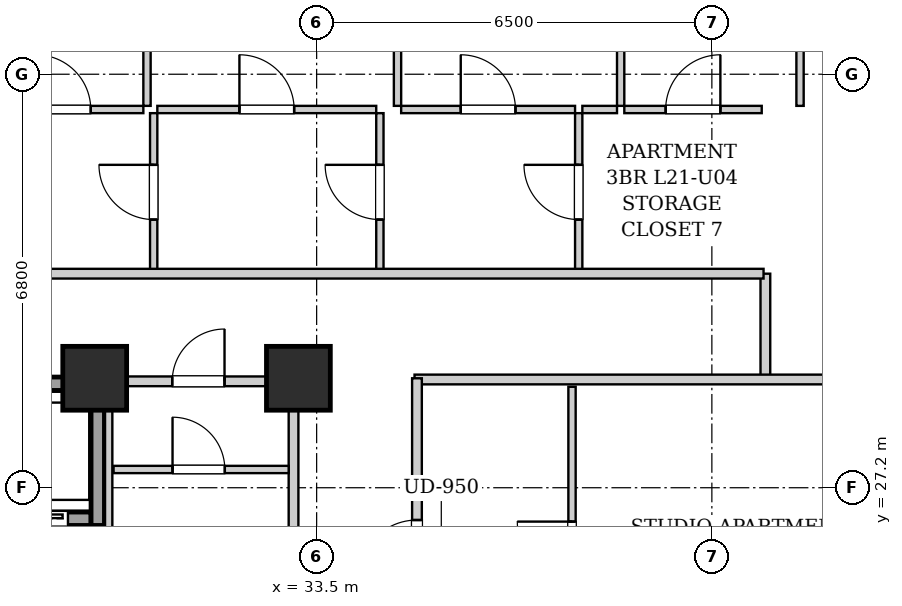
"""IFC4 building model, lengths in metres.
Left out: names, types, materials, properties, quantities, classifications, styles, units other than length and angle.
Written with IfcOpenShell. Run it as: python <this file> out.ifc"""

import sys

from ifc_helpers import new_model, si_unit, direction, frame, frame_2d, origin, origin_2d, place, context, subcontext, project, spatial, rectangle, extrude, element, fill, save


model = new_model("IFC4")
c1 = context("Model", 3, precision=1e-05, world=origin(), true_north=direction((0.0, 1.0)))
c2 = subcontext(c1, "Body", "Model", "MODEL_VIEW")
j1 = project(units=[si_unit("LENGTHUNIT", "METRE"), si_unit("PLANEANGLEUNIT", "RADIAN")], contexts=[c1])
p1 = place(None, origin())
s1 = spatial("IfcSite", under=j1, at=p1, CompositionType="ELEMENT")
p2 = place(p1, origin())
s2 = spatial("IfcBuilding", under=s1, at=p2, CompositionType="ELEMENT")
p3 = place(p2, frame((0.0, 0.0, 78.3)))
s3 = spatial("IfcBuildingStorey", under=s2, at=p3, CompositionType="ELEMENT", Elevation=78.3)
for number, where, z_axis, x_axis in (
    (1, (29.85, 29.0, 0.0), (0.0, 0.0, 1.0), (1.0, 0.0, 0.0)),
    (2, (33.2, 29.0, 0.0), (0.0, 0.0, 1.0), (1.0, 0.0, 0.0)),
):
    element("IfcColumn", number, at=place(p3, frame(where, z_axis=z_axis, x_axis=x_axis)), inside=s3, PredefinedType="COLUMN", context=c2, shape_type="SweptSolid", body=[
        extrude(rectangle(XDim=1.05, YDim=1.05, at=origin_2d()), origin(), (0.0, 0.0, 1.0), 3.2),
    ])
p4 = place(p3, frame((27.93, 26.69, 0.0), z_axis=(0.0, 0.0, 1.0), x_axis=(1.0, 0.0, 0.0)))
e3 = element("IfcWall", 3, at=p4, inside=s3, PredefinedType="SHEAR", context=c2, shape_type="SweptSolid", body=[
    extrude(rectangle(XDim=1.86, YDim=0.22, at=frame_2d((0.93, 0.0))), origin(), (0.0, 0.0, 1.0), 2.94),
])
p5 = place(p4, frame((0.38, 0.0, 0.0)))
e4 = element("IfcOpeningElement", 4, at=p5, cuts=e3, PredefinedType="OPENING", context=c2, shape_type="SweptSolid", body=[
    extrude(rectangle(XDim=1.1, YDim=2.15, at=frame_2d((0.55, 1.075))), frame((0.0, 0.12, 0.0), z_axis=(0.0, -1.0, 0.0), x_axis=(1.0, 0.0, 0.0)), (0.0, 0.0, 1.0), 0.24),
])
p6 = place(p3, frame((27.93, 28.91, 0.0), z_axis=(0.0, 0.0, 1.0), x_axis=(1.0, 0.0, 0.0)))
e5 = element("IfcWall", 5, at=p6, inside=s3, PredefinedType="SHEAR", context=c2, shape_type="SweptSolid", body=[
    extrude(rectangle(XDim=1.86, YDim=0.22, at=frame_2d((0.93, 0.0))), origin(), (0.0, 0.0, 1.0), 2.94),
])
p7 = place(p3, frame((29.9, 26.58, 0.0), z_axis=(0.0, 0.0, 1.0), x_axis=(0.0, 1.0, 0.0)))
e6 = element("IfcWall", 6, at=p7, inside=s3, PredefinedType="SHEAR", context=c2, shape_type="SweptSolid", body=[
    extrude(rectangle(XDim=2.44, YDim=0.22, at=frame_2d((1.22, 0.0))), origin(), (0.0, 0.0, 1.0), 2.94),
])
p8 = place(p3, frame((33.12, 24.12, 0.0), z_axis=(0.0, 0.0, 1.0), x_axis=(0.0, 1.0, 0.0)))
e7 = element("IfcWall", 7, at=p8, inside=s3, PredefinedType="PARTITIONING", context=c2, shape_type="SweptSolid", body=[
    extrude(rectangle(XDim=4.76, YDim=0.16, at=frame_2d((2.38, 0.0))), origin(), (0.0, 0.0, 1.0), 2.275),
])
p9 = place(p3, frame((30.08, 26.18, 0.0), z_axis=(0.0, 0.0, 1.0), x_axis=(0.0, 1.0, 0.0)))
e8 = element("IfcWall", 8, at=p9, inside=s3, PredefinedType="PARTITIONING", context=c2, shape_type="SweptSolid", body=[
    extrude(rectangle(XDim=2.68, YDim=0.12, at=frame_2d((1.34, 0.0))), origin(), (0.0, 0.0, 1.0), 2.94),
])
p10 = place(p3, frame((30.16, 27.5, 0.0), z_axis=(0.0, 0.0, 1.0), x_axis=(1.0, 0.0, 0.0)))
e9 = element("IfcWall", 9, at=p10, inside=s3, PredefinedType="PARTITIONING", context=c2, shape_type="SweptSolid", body=[
    extrude(rectangle(XDim=2.88, YDim=0.12, at=frame_2d((1.44, 0.0))), origin(), (0.0, 0.0, 1.0), 2.94),
])
p11 = place(p10, frame((0.97, 0.0, 0.0)))
e10 = element("IfcOpeningElement", 10, at=p11, cuts=e9, PredefinedType="OPENING", context=c2, shape_type="SweptSolid", body=[
    extrude(rectangle(XDim=0.86, YDim=2.05, at=frame_2d((0.43, 1.025))), frame((0.0, 0.07, 0.0), z_axis=(0.0, -1.0, 0.0), x_axis=(1.0, 0.0, 0.0)), (0.0, 0.0, 1.0), 0.14),
])
p12 = place(p3, frame((30.08, 28.95, 0.0), z_axis=(0.0, 0.0, 1.0), x_axis=(1.0, 0.0, 0.0)))
e11 = element("IfcWall", 11, at=p12, inside=s3, PredefinedType="PARTITIONING", context=c2, shape_type="SweptSolid", body=[
    extrude(rectangle(XDim=2.96, YDim=0.16, at=frame_2d((1.48, 0.0))), origin(), (0.0, 0.0, 1.0), 2.94),
])
p13 = place(p12, frame((1.045, 0.0, 0.0)))
e12 = element("IfcOpeningElement", 12, at=p13, cuts=e11, PredefinedType="OPENING", context=c2, shape_type="SweptSolid", body=[
    extrude(rectangle(XDim=0.86, YDim=2.05, at=frame_2d((0.43, 1.025))), frame((0.0, 0.09, 0.0), z_axis=(0.0, -1.0, 0.0), x_axis=(1.0, 0.0, 0.0)), (0.0, 0.0, 1.0), 0.18),
])
p14 = place(p3, frame((40.88, 28.98, 0.0), z_axis=(0.0, 0.0, 1.0), x_axis=(0.0, 1.0, 0.0)))
e13 = element("IfcWall", 13, at=p14, inside=s3, PredefinedType="PARTITIONING", context=c2, shape_type="SweptSolid", body=[
    extrude(rectangle(XDim=1.74, YDim=0.16, at=frame_2d((0.87, 0.0))), origin(), (0.0, 0.0, 1.0), 2.94),
])
p15 = place(p3, frame((35.11, 28.98, 0.0), z_axis=(0.0, 0.0, 1.0), x_axis=(1.0, 0.0, 0.0)))
e14 = element("IfcWall", 14, at=p15, inside=s3, PredefinedType="PARTITIONING", context=c2, shape_type="SweptSolid", body=[
    extrude(rectangle(XDim=8.01, YDim=0.16, at=frame_2d((4.005, 0.0))), origin(), (0.0, 0.0, 1.0), 2.309),
])
p16 = place(p3, frame((30.82, 30.76, 0.0), z_axis=(0.0, 0.0, 1.0), x_axis=(0.0, 1.0, 0.0)))
e15 = element("IfcWall", 15, at=p16, inside=s3, PredefinedType="PARTITIONING", context=c2, shape_type="SweptSolid", body=[
    extrude(rectangle(XDim=2.6, YDim=0.12, at=frame_2d((1.3, 0.0))), origin(), (0.0, 0.0, 1.0), 2.94),
])
p17 = place(p16, frame((0.85, 0.0, 0.0)))
e16 = element("IfcOpeningElement", 16, at=p17, cuts=e15, PredefinedType="OPENING", context=c2, shape_type="SweptSolid", body=[
    extrude(rectangle(XDim=0.9, YDim=2.05, at=frame_2d((0.45, 1.025))), frame((0.0, 0.07, 0.0), z_axis=(0.0, -1.0, 0.0), x_axis=(1.0, 0.0, 0.0)), (0.0, 0.0, 1.0), 0.14),
])
p18 = place(p3, frame((28.02, 33.42, 0.0), z_axis=(0.0, 0.0, 1.0), x_axis=(1.0, 0.0, 0.0)))
e17 = element("IfcWall", 17, at=p18, inside=s3, PredefinedType="PARTITIONING", context=c2, shape_type="SweptSolid", body=[
    extrude(rectangle(XDim=2.63, YDim=0.12, at=frame_2d((1.315, 0.0))), origin(), (0.0, 0.0, 1.0), 2.94),
])
p19 = place(p18, frame((0.865, 0.0, 0.0)))
e18 = element("IfcOpeningElement", 18, at=p19, cuts=e17, PredefinedType="OPENING", context=c2, shape_type="SweptSolid", body=[
    extrude(rectangle(XDim=0.9, YDim=2.05, at=frame_2d((0.45, 1.025))), frame((0.0, 0.07, 0.0), z_axis=(0.0, -1.0, 0.0), x_axis=(1.0, 0.0, 0.0)), (0.0, 0.0, 1.0), 0.14),
])
p20 = place(p3, frame((34.54, 30.76, 0.0), z_axis=(0.0, 0.0, 1.0), x_axis=(0.0, 1.0, 0.0)))
e19 = element("IfcWall", 19, at=p20, inside=s3, PredefinedType="PARTITIONING", context=c2, shape_type="SweptSolid", body=[
    extrude(rectangle(XDim=2.6, YDim=0.12, at=frame_2d((1.3, 0.0))), origin(), (0.0, 0.0, 1.0), 2.94),
])
p21 = place(p20, frame((0.85, 0.0, 0.0)))
e20 = element("IfcOpeningElement", 20, at=p21, cuts=e19, PredefinedType="OPENING", context=c2, shape_type="SweptSolid", body=[
    extrude(rectangle(XDim=0.9, YDim=2.05, at=frame_2d((0.45, 1.025))), frame((0.0, 0.07, 0.0), z_axis=(0.0, -1.0, 0.0), x_axis=(1.0, 0.0, 0.0)), (0.0, 0.0, 1.0), 0.14),
])
p22 = place(p3, frame((30.88, 33.42, 0.0), z_axis=(0.0, 0.0, 1.0), x_axis=(1.0, 0.0, 0.0)))
e21 = element("IfcWall", 21, at=p22, inside=s3, PredefinedType="PARTITIONING", context=c2, shape_type="SweptSolid", body=[
    extrude(rectangle(XDim=3.6, YDim=0.12, at=frame_2d((1.8, 0.0))), origin(), (0.0, 0.0, 1.0), 2.94),
])
p23 = place(p22, frame((1.35, 0.0, 0.0)))
e22 = element("IfcOpeningElement", 22, at=p23, cuts=e21, PredefinedType="OPENING", context=c2, shape_type="SweptSolid", body=[
    extrude(rectangle(XDim=0.9, YDim=2.05, at=frame_2d((0.45, 1.025))), frame((0.0, 0.07, 0.0), z_axis=(0.0, -1.0, 0.0), x_axis=(1.0, 0.0, 0.0)), (0.0, 0.0, 1.0), 0.14),
])
p24 = place(p3, frame((37.81, 30.76, 0.0), z_axis=(0.0, 0.0, 1.0), x_axis=(0.0, 1.0, 0.0)))
e23 = element("IfcWall", 23, at=p24, inside=s3, PredefinedType="PARTITIONING", context=c2, shape_type="SweptSolid", body=[
    extrude(rectangle(XDim=2.6, YDim=0.12, at=frame_2d((1.3, 0.0))), origin(), (0.0, 0.0, 1.0), 2.94),
])
p25 = place(p24, frame((0.85, 0.0, 0.0)))
e24 = element("IfcOpeningElement", 24, at=p25, cuts=e23, PredefinedType="OPENING", context=c2, shape_type="SweptSolid", body=[
    extrude(rectangle(XDim=0.9, YDim=2.05, at=frame_2d((0.45, 1.025))), frame((0.0, 0.07, 0.0), z_axis=(0.0, -1.0, 0.0), x_axis=(1.0, 0.0, 0.0)), (0.0, 0.0, 1.0), 0.14),
])
p26 = place(p3, frame((34.89, 33.42, 0.0), z_axis=(0.0, 0.0, 1.0), x_axis=(1.0, 0.0, 0.0)))
e25 = element("IfcWall", 25, at=p26, inside=s3, PredefinedType="PARTITIONING", context=c2, shape_type="SweptSolid", body=[
    extrude(rectangle(XDim=2.86, YDim=0.12, at=frame_2d((1.43, 0.0))), origin(), (0.0, 0.0, 1.0), 2.94),
])
p27 = place(p26, frame((0.98, 0.0, 0.0)))
e26 = element("IfcOpeningElement", 26, at=p27, cuts=e25, PredefinedType="OPENING", context=c2, shape_type="SweptSolid", body=[
    extrude(rectangle(XDim=0.9, YDim=2.05, at=frame_2d((0.45, 1.025))), frame((0.0, 0.07, 0.0), z_axis=(0.0, -1.0, 0.0), x_axis=(1.0, 0.0, 0.0)), (0.0, 0.0, 1.0), 0.14),
])
p28 = place(p3, frame((37.87, 33.42, 0.0), z_axis=(0.0, 0.0, 1.0), x_axis=(1.0, 0.0, 0.0)))
e27 = element("IfcWall", 27, at=p28, inside=s3, PredefinedType="PARTITIONING", context=c2, shape_type="SweptSolid", body=[
    extrude(rectangle(XDim=0.57, YDim=0.12, at=frame_2d((0.285, 0.0))), origin(), (0.0, 0.0, 1.0), 2.94),
])
p29 = place(p3, frame((38.56, 33.42, 0.0), z_axis=(0.0, 0.0, 1.0), x_axis=(1.0, 0.0, 0.0)))
e28 = element("IfcWall", 28, at=p29, inside=s3, PredefinedType="PARTITIONING", context=c2, shape_type="SweptSolid", body=[
    extrude(rectangle(XDim=2.26, YDim=0.12, at=frame_2d((1.13, 0.0))), origin(), (0.0, 0.0, 1.0), 2.94),
])
p30 = place(p29, frame((0.68, 0.0, 0.0)))
e29 = element("IfcOpeningElement", 29, at=p30, cuts=e28, PredefinedType="OPENING", context=c2, shape_type="SweptSolid", body=[
    extrude(rectangle(XDim=0.9, YDim=2.05, at=frame_2d((0.45, 1.025))), frame((0.0, 0.07, 0.0), z_axis=(0.0, -1.0, 0.0), x_axis=(1.0, 0.0, 0.0)), (0.0, 0.0, 1.0), 0.14),
])
p31 = place(p3, frame((30.71, 33.48, 0.0), z_axis=(0.0, 0.0, 1.0), x_axis=(0.0, 1.0, 0.0)))
e30 = element("IfcWall", 30, at=p31, inside=s3, PredefinedType="PARTITIONING", context=c2, shape_type="SweptSolid", body=[
    extrude(rectangle(XDim=9.54, YDim=0.12, at=frame_2d((4.77, 0.0))), origin(), (0.0, 0.0, 1.0), 2.94),
])
p32 = place(p31, frame((4.305, 0.0, 0.0)))
e31 = element("IfcOpeningElement", 31, at=p32, cuts=e30, PredefinedType="OPENING", context=c2, shape_type="SweptSolid", body=[
    extrude(rectangle(XDim=0.9, YDim=2.05, at=frame_2d((0.45, 1.025))), frame((0.0, 0.07, 0.0), z_axis=(0.0, -1.0, 0.0), x_axis=(1.0, 0.0, 0.0)), (0.0, 0.0, 1.0), 0.14),
])
p33 = place(p3, frame((34.83, 33.48, 0.0), z_axis=(0.0, 0.0, 1.0), x_axis=(0.0, 1.0, 0.0)))
e32 = element("IfcWall", 32, at=p33, inside=s3, PredefinedType="PARTITIONING", context=c2, shape_type="SweptSolid", body=[
    extrude(rectangle(XDim=7.39, YDim=0.12, at=frame_2d((3.695, 0.0))), origin(), (0.0, 0.0, 1.0), 2.94),
])
p34 = place(p33, frame((3.245, 0.0, 0.0)))
e33 = element("IfcOpeningElement", 33, at=p34, cuts=e32, PredefinedType="OPENING", context=c2, shape_type="SweptSolid", body=[
    extrude(rectangle(XDim=0.9, YDim=2.05, at=frame_2d((0.45, 1.025))), frame((0.0, 0.07, 0.0), z_axis=(0.0, -1.0, 0.0), x_axis=(1.0, 0.0, 0.0)), (0.0, 0.0, 1.0), 0.14),
])
p35 = place(p3, frame((38.5, 33.48, 0.0), z_axis=(0.0, 0.0, 1.0), x_axis=(0.0, 1.0, 0.0)))
e34 = element("IfcWall", 34, at=p35, inside=s3, PredefinedType="PARTITIONING", context=c2, shape_type="SweptSolid", body=[
    extrude(rectangle(XDim=7.39, YDim=0.12, at=frame_2d((3.695, 0.0))), origin(), (0.0, 0.0, 1.0), 2.94),
])
p36 = place(p35, frame((3.245, 0.0, 0.0)))
e35 = element("IfcOpeningElement", 35, at=p36, cuts=e34, PredefinedType="OPENING", context=c2, shape_type="SweptSolid", body=[
    extrude(rectangle(XDim=0.9, YDim=2.05, at=frame_2d((0.45, 1.025))), frame((0.0, 0.07, 0.0), z_axis=(0.0, -1.0, 0.0), x_axis=(1.0, 0.0, 0.0)), (0.0, 0.0, 1.0), 0.14),
])
p37 = place(p3, frame((41.45, 33.48, 0.0), z_axis=(0.0, 0.0, 1.0), x_axis=(0.0, 1.0, 0.0)))
e36 = element("IfcWall", 36, at=p37, inside=s3, PredefinedType="PARTITIONING", context=c2, shape_type="SweptSolid", body=[
    extrude(rectangle(XDim=7.39, YDim=0.12, at=frame_2d((3.695, 0.0))), origin(), (0.0, 0.0, 1.0), 2.94),
])
p38 = place(p37, frame((3.2, 0.0, 0.0)))
e37 = element("IfcOpeningElement", 37, at=p38, cuts=e36, PredefinedType="OPENING", context=c2, shape_type="SweptSolid", body=[
    extrude(rectangle(XDim=0.9, YDim=2.05, at=frame_2d((0.45, 1.025))), frame((0.0, 0.07, 0.0), z_axis=(0.0, -1.0, 0.0), x_axis=(1.0, 0.0, 0.0)), (0.0, 0.0, 1.0), 0.14),
])
p39 = place(p3, frame((37.7, 23.527, 0.0), z_axis=(0.0, 0.0, 1.0), x_axis=(0.0, 1.0, 0.0)))
e38 = element("IfcWall", 38, at=p39, inside=s3, PredefinedType="PARTITIONING", context=c2, shape_type="SweptSolid", body=[
    extrude(rectangle(XDim=5.333, YDim=0.12, at=frame_2d((2.667, 0.0))), origin(), (0.0, 0.0, 1.0), 2.94),
])
p40 = place(p39, frame((2.216, 0.0, 0.0)))
e39 = element("IfcOpeningElement", 39, at=p40, cuts=e38, PredefinedType="OPENING", context=c2, shape_type="SweptSolid", body=[
    extrude(rectangle(XDim=0.9, YDim=2.05, at=frame_2d((0.45, 1.025))), frame((0.0, 0.07, 0.0), z_axis=(0.0, -1.0, 0.0), x_axis=(1.0, 0.0, 0.0)), (0.0, 0.0, 1.0), 0.14),
])
p41 = place(p3, frame((10.05, 30.72, 0.0), z_axis=(0.0, 0.0, 1.0), x_axis=(1.0, 0.0, 0.0)))
e40 = element("IfcWall", 40, at=p41, inside=s3, PredefinedType="PARTITIONING", context=c2, shape_type="SweptSolid", body=[
    extrude(rectangle(XDim=30.8, YDim=0.16, at=frame_2d((15.4, 0.0))), origin(), (0.0, 0.0, 1.0), 2.94),
])
p42 = place(p41, frame((4.165, 0.0, 0.0)))
e41 = element("IfcOpeningElement", 41, at=p42, cuts=e40, PredefinedType="OPENING", context=c2, shape_type="SweptSolid", body=[
    extrude(rectangle(XDim=0.95, YDim=2.1, at=frame_2d((0.475, 1.05))), frame((0.0, 0.09, 0.0), z_axis=(0.0, -1.0, 0.0), x_axis=(1.0, 0.0, 0.0)), (0.0, 0.0, 1.0), 0.18),
])
p43 = place(p3, frame((35.15, 15.07, 0.0), z_axis=(0.0, 0.0, 1.0), x_axis=(0.0, 1.0, 0.0)))
e42 = element("IfcWall", 42, at=p43, inside=s3, PredefinedType="PARTITIONING", context=c2, shape_type="SweptSolid", body=[
    extrude(rectangle(XDim=13.93, YDim=0.16, at=frame_2d((6.965, 0.0))), origin(), (0.0, 0.0, 1.0), 2.94),
])
p44 = place(p43, frame((3.608, 0.0, 0.0)))
e43 = element("IfcOpeningElement", 43, at=p44, cuts=e42, PredefinedType="OPENING", context=c2, shape_type="SweptSolid", body=[
    extrude(rectangle(XDim=0.95, YDim=2.1, at=frame_2d((0.475, 1.05))), frame((0.0, 0.09, 0.0), z_axis=(0.0, -1.0, 0.0), x_axis=(1.0, 0.0, 0.0)), (0.0, 0.0, 1.0), 0.18),
])
p45 = place(p43, frame((10.649, 0.0, 0.0)))
e44 = element("IfcOpeningElement", 44, at=p45, cuts=e42, PredefinedType="OPENING", context=c2, shape_type="SweptSolid", body=[
    extrude(rectangle(XDim=0.95, YDim=2.1, at=frame_2d((0.475, 1.05))), frame((0.0, 0.09, 0.0), z_axis=(0.0, -1.0, 0.0), x_axis=(1.0, 0.0, 0.0)), (0.0, 0.0, 1.0), 0.18),
])
p46 = place(p5, origin())
e45 = element("IfcDoor", 45, at=p46, inside=s3, OperationType="SLIDING_TO_LEFT", PredefinedType="DOOR", context=c2, shape_type="SweptSolid", body=[
    extrude(rectangle(XDim=1.1, YDim=2.15, at=frame_2d((0.55, 1.075))), frame((0.0, 0.025, 0.0), z_axis=(0.0, -1.0, 0.0), x_axis=(1.0, 0.0, 0.0)), (0.0, 0.0, 1.0), 0.05),
])
fill(e4, e45)
p47 = place(p11, origin())
e46 = element("IfcDoor", 46, at=p47, inside=s3, OperationType="SINGLE_SWING_LEFT", PredefinedType="DOOR", context=c2, shape_type="SweptSolid", body=[
    extrude(rectangle(XDim=0.86, YDim=2.05, at=frame_2d((0.43, 1.025))), frame((0.0, 0.025, 0.0), z_axis=(0.0, -1.0, 0.0), x_axis=(1.0, 0.0, 0.0)), (0.0, 0.0, 1.0), 0.05),
])
fill(e10, e46)
p48 = place(p13, origin())
e47 = element("IfcDoor", 47, at=p48, inside=s3, OperationType="SINGLE_SWING_RIGHT", PredefinedType="DOOR", context=c2, shape_type="SweptSolid", body=[
    extrude(rectangle(XDim=0.86, YDim=2.05, at=frame_2d((0.43, 1.025))), frame((0.0, 0.025, 0.0), z_axis=(0.0, -1.0, 0.0), x_axis=(1.0, 0.0, 0.0)), (0.0, 0.0, 1.0), 0.05),
])
fill(e12, e47)
p49 = place(p17, origin())
e48 = element("IfcDoor", 48, at=p49, inside=s3, OperationType="SINGLE_SWING_RIGHT", PredefinedType="DOOR", context=c2, shape_type="SweptSolid", body=[
    extrude(rectangle(XDim=0.9, YDim=2.05, at=frame_2d((0.45, 1.025))), frame((0.0, 0.025, 0.0), z_axis=(0.0, -1.0, 0.0), x_axis=(1.0, 0.0, 0.0)), (0.0, 0.0, 1.0), 0.05),
])
fill(e16, e48)
p50 = place(p19, origin())
e49 = element("IfcDoor", 49, at=p50, inside=s3, OperationType="SINGLE_SWING_LEFT", PredefinedType="DOOR", context=c2, shape_type="SweptSolid", body=[
    extrude(rectangle(XDim=0.9, YDim=2.05, at=frame_2d((0.45, 1.025))), frame((0.0, 0.025, 0.0), z_axis=(0.0, -1.0, 0.0), x_axis=(1.0, 0.0, 0.0)), (0.0, 0.0, 1.0), 0.05),
])
fill(e18, e49)
p51 = place(p21, origin())
e50 = element("IfcDoor", 50, at=p51, inside=s3, OperationType="SINGLE_SWING_RIGHT", PredefinedType="DOOR", context=c2, shape_type="SweptSolid", body=[
    extrude(rectangle(XDim=0.9, YDim=2.05, at=frame_2d((0.45, 1.025))), frame((0.0, 0.025, 0.0), z_axis=(0.0, -1.0, 0.0), x_axis=(1.0, 0.0, 0.0)), (0.0, 0.0, 1.0), 0.05),
])
fill(e20, e50)
p52 = place(p23, origin())
e51 = element("IfcDoor", 51, at=p52, inside=s3, OperationType="SINGLE_SWING_LEFT", PredefinedType="DOOR", context=c2, shape_type="SweptSolid", body=[
    extrude(rectangle(XDim=0.9, YDim=2.05, at=frame_2d((0.45, 1.025))), frame((0.0, 0.025, 0.0), z_axis=(0.0, -1.0, 0.0), x_axis=(1.0, 0.0, 0.0)), (0.0, 0.0, 1.0), 0.05),
])
fill(e22, e51)
p53 = place(p25, origin())
e52 = element("IfcDoor", 52, at=p53, inside=s3, OperationType="SINGLE_SWING_RIGHT", PredefinedType="DOOR", context=c2, shape_type="SweptSolid", body=[
    extrude(rectangle(XDim=0.9, YDim=2.05, at=frame_2d((0.45, 1.025))), frame((0.0, 0.025, 0.0), z_axis=(0.0, -1.0, 0.0), x_axis=(1.0, 0.0, 0.0)), (0.0, 0.0, 1.0), 0.05),
])
fill(e24, e52)
p54 = place(p27, origin())
e53 = element("IfcDoor", 53, at=p54, inside=s3, OperationType="SINGLE_SWING_LEFT", PredefinedType="DOOR", context=c2, shape_type="SweptSolid", body=[
    extrude(rectangle(XDim=0.9, YDim=2.05, at=frame_2d((0.45, 1.025))), frame((0.0, 0.025, 0.0), z_axis=(0.0, -1.0, 0.0), x_axis=(1.0, 0.0, 0.0)), (0.0, 0.0, 1.0), 0.05),
])
fill(e26, e53)
p55 = place(p30, origin())
e54 = element("IfcDoor", 54, at=p55, inside=s3, OperationType="SINGLE_SWING_RIGHT", PredefinedType="DOOR", context=c2, shape_type="SweptSolid", body=[
    extrude(rectangle(XDim=0.9, YDim=2.05, at=frame_2d((0.45, 1.025))), frame((0.0, 0.025, 0.0), z_axis=(0.0, -1.0, 0.0), x_axis=(1.0, 0.0, 0.0)), (0.0, 0.0, 1.0), 0.05),
])
fill(e29, e54)
p56 = place(p40, origin())
e55 = element("IfcDoor", 55, at=p56, inside=s3, OperationType="SINGLE_SWING_RIGHT", PredefinedType="DOOR", context=c2, shape_type="SweptSolid", body=[
    extrude(rectangle(XDim=0.9, YDim=2.05, at=frame_2d((0.45, 1.025))), frame((0.0, 0.025, 0.0), z_axis=(0.0, -1.0, 0.0), x_axis=(1.0, 0.0, 0.0)), (0.0, 0.0, 1.0), 0.05),
])
fill(e39, e55)
p57 = place(p45, origin())
e56 = element("IfcDoor", 56, at=p57, inside=s3, OperationType="SINGLE_SWING_LEFT", PredefinedType="DOOR", context=c2, shape_type="SweptSolid", body=[
    extrude(rectangle(XDim=0.95, YDim=2.1, at=frame_2d((0.475, 1.05))), frame((0.0, 0.025, 0.0), z_axis=(0.0, -1.0, 0.0), x_axis=(1.0, 0.0, 0.0)), (0.0, 0.0, 1.0), 0.05),
])
fill(e44, e56)
save(model, sys.argv[1])
